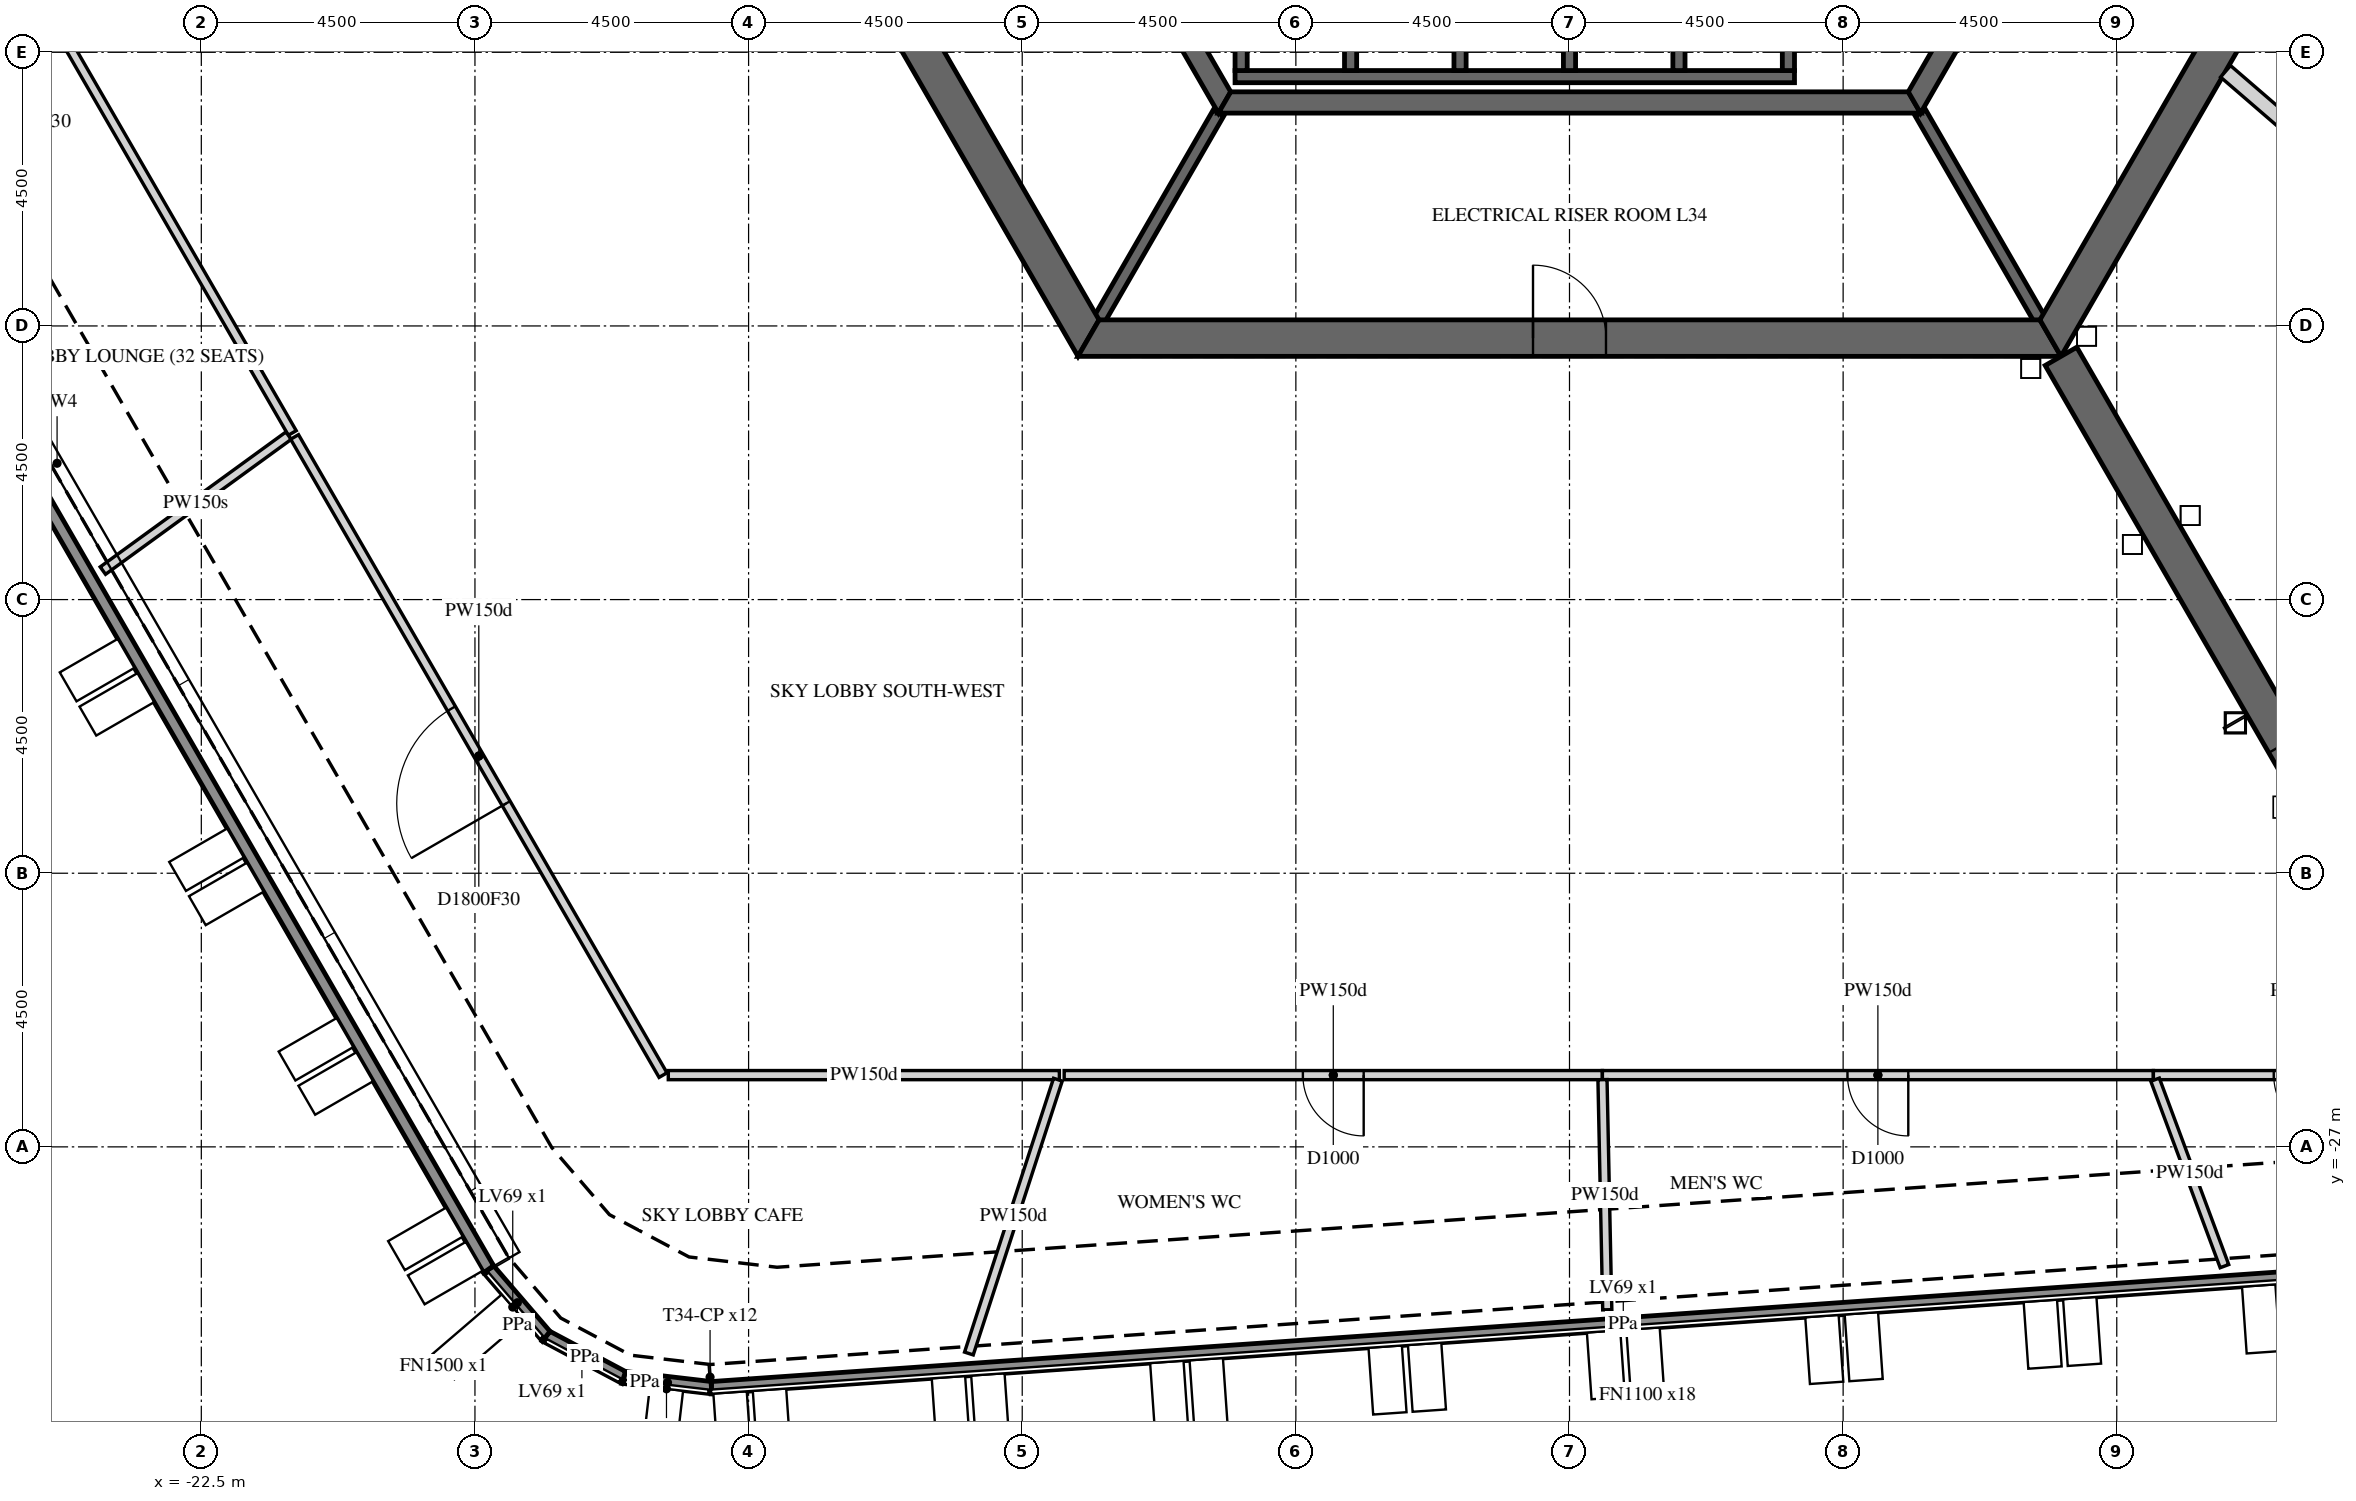
"""IFC4 building model, lengths in metres.
Left out: names, types, materials, properties, quantities, classifications, styles, units other than length and angle.
Written with IfcOpenShell. Run it as: python <this file> out.ifc"""

import sys

from ifc_helpers import new_model, si_unit, direction, frame, frame_2d, origin, place, context, subcontext, project, spatial, polyline, rectangle, outline, extrude, element, fill, save


model = new_model("IFC4")
c1 = context("Model", 3, precision=1e-05, world=origin(), true_north=direction((0.0, 1.0)))
c2 = subcontext(c1, "Body", "Model", "MODEL_VIEW")
j1 = project(units=[si_unit("LENGTHUNIT", "METRE"), si_unit("PLANEANGLEUNIT", "RADIAN")], contexts=[c1])
p1 = place(None, origin())
s1 = spatial("IfcSite", under=j1, at=p1, CompositionType="ELEMENT")
p2 = place(p1, origin())
s2 = spatial("IfcBuilding", under=s1, at=p2, CompositionType="ELEMENT")
p3 = place(p2, frame((0.0, 0.0, 146.7)))
s3 = spatial("IfcBuildingStorey", under=s2, at=p3, CompositionType="ELEMENT", Elevation=146.7)
p4 = place(p3, frame((15.868, -28.863, 5.7), z_axis=(0.0, 0.0, 1.0), x_axis=(-0.99756405733, -0.069756372641, 0.0)))
e1 = element("IfcWall", 1, at=p4, inside=s3, PredefinedType="PARAPET", context=c2, shape_type="SweptSolid", body=[
    extrude(outline(polyline([(0.008, -0.1), (30.044, -0.1), (30.063, 0.1), (-0.008, 0.1), (0.008, -0.1)])), origin(), (0.0, 0.0, 1.0), 1.1),
])
p5 = place(p3, frame((-14.112, -30.96, 5.7), z_axis=(0.0, 0.0, 1.0), x_axis=(-0.993251202983, 0.115982963286, 0.0)))
e2 = element("IfcWall", 2, at=p5, inside=s3, PredefinedType="PARAPET", context=c2, shape_type="SweptSolid", body=[
    extrude(outline(polyline([(0.009, -0.1), (1.434, -0.1), (1.471, 0.1), (-0.009, 0.1), (0.009, -0.1)])), origin(), (0.0, 0.0, 1.0), 1.1),
])
p6 = place(p3, frame((-15.555, -30.791, 5.7), z_axis=(0.0, 0.0, 1.0), x_axis=(-0.882946998442, 0.46947268072, 0.0)))
e3 = element("IfcWall", 3, at=p6, inside=s3, PredefinedType="PARAPET", context=c2, shape_type="SweptSolid", body=[
    extrude(outline(polyline([(0.019, -0.1), (1.424, -0.1), (1.462, 0.1), (-0.019, 0.1), (0.019, -0.1)])), origin(), (0.0, 0.0, 1.0), 1.1),
])
p7 = place(p3, frame((-16.829, -30.114, 5.7), z_axis=(0.0, 0.0, 1.0), x_axis=(-0.651732002744, 0.75844933687, 0.0)))
e4 = element("IfcWall", 4, at=p7, inside=s3, PredefinedType="PARAPET", context=c2, shape_type="SweptSolid", body=[
    extrude(outline(polyline([(0.019, -0.1), (1.443, -0.1), (1.462, 0.1), (-0.019, 0.1), (0.019, -0.1)])), origin(), (0.0, 0.0, 1.0), 1.1),
])
p8 = place(p3, frame((-17.776, -29.012, 5.7), z_axis=(0.0, 0.0, 1.0), x_axis=(-0.499996465352, 0.866027444505, 0.0)))
e5 = element("IfcWall", 5, at=p8, inside=s3, PredefinedType="PARAPET", context=c2, shape_type="SweptSolid", body=[
    extrude(outline(polyline([(0.009, -0.1), (30.045, -0.1), (30.062, 0.1), (-0.009, 0.1), (0.009, -0.1)])), origin(), (0.0, 0.0, 1.0), 1.1),
])
p9 = place(p3, frame((-15.819, 0.0, -0.3), z_axis=(0.0, 0.0, 1.0), x_axis=(0.499999880136, -0.866025472988, 0.0)))
e6 = element("IfcWall", 6, at=p9, inside=s3, PredefinedType="SHEAR", context=c2, shape_type="SweptSolid", body=[
    extrude(outline(polyline([(-0.173, -0.3), (15.993, -0.3), (15.646, 0.3), (0.173, 0.3), (-0.173, -0.3)])), origin(), (0.0, 0.0, 1.0), 5.8),
])
p10 = place(p9, frame((6.981, 0.0, 0.3)))
e7 = element("IfcOpeningElement", 7, at=p10, cuts=e6, PredefinedType="OPENING", context=c2, shape_type="SweptSolid", body=[
    extrude(rectangle(XDim=1.8, YDim=2.4, at=frame_2d((0.9, 1.2))), frame((0.0, 0.31, 0.0), z_axis=(0.0, -1.0, 0.0), x_axis=(1.0, 0.0, 0.0)), (0.0, 0.0, 1.0), 0.62),
])
p11 = place(p3, frame((-7.91, -13.7, -0.3), z_axis=(0.0, 0.0, 1.0), x_axis=(1.0, 0.0, 0.0)))
e8 = element("IfcWall", 8, at=p11, inside=s3, PredefinedType="SHEAR", context=c2, shape_type="SweptSolid", body=[
    extrude(outline(polyline([(-0.173, -0.3), (15.993, -0.3), (15.646, 0.3), (0.173, 0.3), (-0.173, -0.3)])), origin(), (0.0, 0.0, 1.0), 5.8),
])
p12 = place(p11, frame((7.31, 0.0, 0.3)))
e9 = element("IfcOpeningElement", 9, at=p12, cuts=e8, PredefinedType="OPENING", context=c2, shape_type="SweptSolid", body=[
    extrude(rectangle(XDim=1.2, YDim=2.4, at=frame_2d((0.6, 1.2))), frame((0.0, 0.31, 0.0), z_axis=(0.0, -1.0, 0.0), x_axis=(1.0, 0.0, 0.0)), (0.0, 0.0, 1.0), 0.62),
])
p13 = place(p3, frame((7.91, -13.7, -0.3), z_axis=(0.0, 0.0, 1.0), x_axis=(0.499999880136, 0.866025472988, 0.0)))
e10 = element("IfcWall", 10, at=p13, inside=s3, PredefinedType="SHEAR", context=c2, shape_type="SweptSolid", body=[
    extrude(outline(polyline([(-0.173, -0.3), (15.993, -0.3), (15.646, 0.3), (0.173, 0.3), (-0.173, -0.3)])), origin(), (0.0, 0.0, 1.0), 5.8),
])
p14 = place(p13, frame((7.039, 0.0, 0.3)))
e11 = element("IfcOpeningElement", 11, at=p14, cuts=e10, PredefinedType="OPENING", context=c2, shape_type="SweptSolid", body=[
    extrude(rectangle(XDim=1.8, YDim=2.4, at=frame_2d((0.9, 1.2))), frame((0.0, 0.31, 0.0), z_axis=(0.0, -1.0, 0.0), x_axis=(1.0, 0.0, 0.0)), (0.0, 0.0, 1.0), 0.62),
])
p15 = place(p3, frame((8.083, -14.0, -0.3), z_axis=(0.0, 0.0, 1.0), x_axis=(0.499997680643, -0.866026742862, 0.0)))
e12 = element("IfcWall", 12, at=p15, inside=s3, PredefinedType="SHEAR", context=c2, shape_type="SweptSolid", body=[
    extrude(rectangle(XDim=16.509, YDim=0.6, at=frame_2d((8.254, 0.0))), origin(), (0.0, 0.0, 1.0), 5.8),
])
p16 = place(p15, frame((7.354, 0.0, 0.3)))
e13 = element("IfcOpeningElement", 13, at=p16, cuts=e12, PredefinedType="OPENING", context=c2, shape_type="SweptSolid", body=[
    extrude(rectangle(XDim=1.8, YDim=2.4, at=frame_2d((0.9, 1.2))), frame((0.0, 0.31, 0.0), z_axis=(0.0, -1.0, 0.0), x_axis=(1.0, 0.0, 0.0)), (0.0, 0.0, 1.0), 0.62),
])
p17 = place(p3, frame((-11.345, 0.0, -0.3), z_axis=(0.0, 0.0, 1.0), x_axis=(0.499995046907, -0.866028263435, 0.0)))
e14 = element("IfcWall", 14, at=p17, inside=s3, PredefinedType="SHEAR", context=c2, shape_type="SweptSolid", body=[
    extrude(outline(polyline([(-0.101, -0.175), (11.446, -0.175), (11.244, 0.175), (0.101, 0.175), (-0.101, -0.175)])), origin(), (0.0, 0.0, 1.0), 5.8),
])
p18 = place(p17, frame((4.744, 0.0, 0.3)))
e15 = element("IfcOpeningElement", 15, at=p18, cuts=e14, PredefinedType="OPENING", context=c2, shape_type="SweptSolid", body=[
    extrude(rectangle(XDim=1.8, YDim=2.4, at=frame_2d((0.9, 1.2))), frame((0.0, 0.185, 0.0), z_axis=(0.0, -1.0, 0.0), x_axis=(1.0, 0.0, 0.0)), (0.0, 0.0, 1.0), 0.37),
])
p19 = place(p3, frame((-5.673, -9.825, -0.3), z_axis=(0.0, 0.0, 1.0), x_axis=(1.0, 0.0, 0.0)))
e16 = element("IfcWall", 16, at=p19, inside=s3, PredefinedType="SHEAR", context=c2, shape_type="SweptSolid", body=[
    extrude(outline(polyline([(-0.101, -0.175), (11.446, -0.175), (11.244, 0.175), (0.101, 0.175), (-0.101, -0.175)])), origin(), (0.0, 0.0, 1.0), 5.8),
])
p20 = place(p3, frame((5.673, -9.825, -0.3), z_axis=(0.0, 0.0, 1.0), x_axis=(0.499995046907, 0.866028263435, 0.0)))
e17 = element("IfcWall", 17, at=p20, inside=s3, PredefinedType="SHEAR", context=c2, shape_type="SweptSolid", body=[
    extrude(outline(polyline([(-0.101, -0.175), (11.446, -0.175), (11.244, 0.175), (0.101, 0.175), (-0.101, -0.175)])), origin(), (0.0, 0.0, 1.0), 5.8),
])
p21 = place(p20, frame((4.801, 0.0, 0.3)))
e18 = element("IfcOpeningElement", 18, at=p21, cuts=e17, PredefinedType="OPENING", context=c2, shape_type="SweptSolid", body=[
    extrude(rectangle(XDim=1.8, YDim=2.4, at=frame_2d((0.9, 1.2))), frame((0.0, 0.185, 0.0), z_axis=(0.0, -1.0, 0.0), x_axis=(1.0, 0.0, 0.0)), (0.0, 0.0, 1.0), 0.37),
])
p22 = place(p3, frame((-5.5, -9.4, -0.25), z_axis=(0.0, 0.0, 1.0), x_axis=(1.0, 0.0, 0.0)))
e19 = element("IfcWall", 19, at=p22, inside=s3, PredefinedType="SHEAR", context=c2, shape_type="SweptSolid", body=[
    extrude(rectangle(XDim=9.2, YDim=0.2, at=frame_2d((4.6, 0.0))), origin(), (0.0, 0.0, 1.0), 5.75),
])
for number, where, z_axis, x_axis in (
    (20, (-5.4, -9.3, -0.25), (0.0, 0.0, 1.0), (0.0, 1.0, 0.0)),
    (21, (-3.6, -9.3, -0.25), (0.0, 0.0, 1.0), (0.0, 1.0, 0.0)),
    (22, (-1.8, -9.3, -0.25), (0.0, 0.0, 1.0), (0.0, 1.0, 0.0)),
    (23, (0.0, -9.3, -0.25), (0.0, 0.0, 1.0), (0.0, 1.0, 0.0)),
    (24, (1.8, -9.3, -0.25), (0.0, 0.0, 1.0), (0.0, 1.0, 0.0)),
    (25, (3.6, -9.3, -0.25), (0.0, 0.0, 1.0), (0.0, 1.0, 0.0)),
):
    element("IfcWall", number, at=place(p3, frame(where, z_axis=z_axis, x_axis=x_axis)), inside=s3, PredefinedType="SHEAR", context=c2, shape_type="SweptSolid", body=[
        extrude(rectangle(XDim=2.9, YDim=0.2, at=frame_2d((1.45, 0.0))), origin(), (0.0, 0.0, 1.0), 5.75),
    ])
for number, where, z_axis, x_axis in (
    (26, (-5.773, -10.0, -0.3), (0.0, 0.0, 1.0), (-0.5, -0.866, 0.0)),
    (27, (5.773, -10.0, -0.3), (0.0, 0.0, 1.0), (0.5, -0.866, 0.0)),
):
    element("IfcWall", number, at=place(p3, frame(where, z_axis=z_axis, x_axis=x_axis)), inside=s3, PredefinedType="SHEAR", context=c2, shape_type="SweptSolid", body=[
        extrude(rectangle(XDim=3.926, YDim=0.2, at=frame_2d((1.963, 0.0))), origin(), (0.0, 0.0, 1.0), 5.8),
    ])
p23 = place(p3, frame((-21.004, -15.26, 0.0), z_axis=(0.0, 0.0, 1.0), x_axis=(-0.500003019955, 0.866023660206, 0.0)))
e28 = element("IfcWall", 28, at=p23, inside=s3, PredefinedType="PARTITIONING", context=c2, shape_type="SweptSolid", body=[
    extrude(rectangle(XDim=17.274, YDim=0.15, at=frame_2d((8.637, 0.0))), origin(), (0.0, 0.0, 1.0), 5.5),
])
p24 = place(p23, frame((7.737, 0.0, 0.0)))
e29 = element("IfcOpeningElement", 29, at=p24, cuts=e28, PredefinedType="OPENING", context=c2, shape_type="SweptSolid", body=[
    extrude(rectangle(XDim=1.8, YDim=2.1, at=frame_2d((0.9, 1.05))), frame((0.0, 0.085, 0.0), z_axis=(0.0, -1.0, 0.0), x_axis=(1.0, 0.0, 0.0)), (0.0, 0.0, 1.0), 0.17),
])
p25 = place(p3, frame((-24.119, -17.524, 0.0), z_axis=(0.0, 0.0, 1.0), x_axis=(0.808965341516, 0.587856339786, 0.0)))
e30 = element("IfcWall", 30, at=p25, inside=s3, PredefinedType="PARTITIONING", context=c2, shape_type="SweptSolid", body=[
    extrude(rectangle(XDim=3.775, YDim=0.15, at=frame_2d((1.888, 0.0))), origin(), (0.0, 0.0, 1.0), 4.573),
])
p26 = place(p3, frame((-14.907, -25.82, 0.0), z_axis=(0.0, 0.0, 1.0), x_axis=(-0.500006708318, 0.866021530701, 0.0)))
e31 = element("IfcWall", 31, at=p26, inside=s3, PredefinedType="PARTITIONING", context=c2, shape_type="SweptSolid", body=[
    extrude(rectangle(XDim=12.118, YDim=0.15, at=frame_2d((6.059, 0.0))), origin(), (0.0, 0.0, 1.0), 5.5),
])
p27 = place(p26, frame((5.159, 0.0, 0.0)))
e32 = element("IfcOpeningElement", 32, at=p27, cuts=e31, PredefinedType="OPENING", context=c2, shape_type="SweptSolid", body=[
    extrude(rectangle(XDim=1.8, YDim=2.1, at=frame_2d((0.9, 1.05))), frame((0.0, 0.085, 0.0), z_axis=(0.0, -1.0, 0.0), x_axis=(1.0, 0.0, 0.0)), (0.0, 0.0, 1.0), 0.17),
])
p28 = place(p3, frame((-14.82, -25.82, 0.0), z_axis=(0.0, 0.0, 1.0), x_axis=(1.0, 0.0, 0.0)))
e33 = element("IfcWall", 33, at=p28, inside=s3, PredefinedType="PARTITIONING", context=c2, shape_type="SweptSolid", body=[
    extrude(rectangle(XDim=6.431, YDim=0.15, at=frame_2d((3.216, 0.0))), origin(), (0.0, 0.0, 1.0), 5.5),
])
p29 = place(p3, frame((-9.877, -30.398, 0.0), z_axis=(0.0, 0.0, 1.0), x_axis=(0.309056925189, 0.95104354106, 0.0)))
e34 = element("IfcWall", 34, at=p29, inside=s3, PredefinedType="PARTITIONING", context=c2, shape_type="SweptSolid", body=[
    extrude(rectangle(XDim=4.735, YDim=0.15, at=frame_2d((2.367, 0.0))), origin(), (0.0, 0.0, 1.0), 5.5),
])
p30 = place(p3, frame((0.541, -25.82, 0.0), z_axis=(0.0, 0.0, 1.0), x_axis=(-1.0, 0.0, 0.0)))
e35 = element("IfcWall", 35, at=p30, inside=s3, PredefinedType="PARTITIONING", context=c2, shape_type="SweptSolid", body=[
    extrude(rectangle(XDim=8.851, YDim=0.15, at=frame_2d((4.426, 0.0))), origin(), (0.0, 0.0, 1.0), 5.5),
])
p31 = place(p30, frame((3.926, 0.0, 0.0)))
e36 = element("IfcOpeningElement", 36, at=p31, cuts=e35, PredefinedType="OPENING", context=c2, shape_type="SweptSolid", body=[
    extrude(rectangle(XDim=1.0, YDim=2.1, at=frame_2d((0.5, 1.05))), frame((0.0, 0.085, 0.0), z_axis=(0.0, -1.0, 0.0), x_axis=(1.0, 0.0, 0.0)), (0.0, 0.0, 1.0), 0.17),
])
p32 = place(p3, frame((9.602, -25.82, 0.0), z_axis=(0.0, 0.0, 1.0), x_axis=(-1.0, 0.0, 0.0)))
e37 = element("IfcWall", 37, at=p32, inside=s3, PredefinedType="PARTITIONING", context=c2, shape_type="SweptSolid", body=[
    extrude(rectangle(XDim=9.061, YDim=0.15, at=frame_2d((4.531, 0.0))), origin(), (0.0, 0.0, 1.0), 5.5),
])
p33 = place(p32, frame((4.031, 0.0, 0.0)))
e38 = element("IfcOpeningElement", 38, at=p33, cuts=e37, PredefinedType="OPENING", context=c2, shape_type="SweptSolid", body=[
    extrude(rectangle(XDim=1.0, YDim=2.1, at=frame_2d((0.5, 1.05))), frame((0.0, 0.085, 0.0), z_axis=(0.0, -1.0, 0.0), x_axis=(1.0, 0.0, 0.0)), (0.0, 0.0, 1.0), 0.17),
])
p34 = place(p3, frame((0.621, -29.679, 0.0), z_axis=(0.0, 0.0, 1.0), x_axis=(-0.020771051759, 0.999784258432, 0.0)))
e39 = element("IfcWall", 39, at=p34, inside=s3, PredefinedType="PARTITIONING", context=c2, shape_type="SweptSolid", body=[
    extrude(rectangle(XDim=3.785, YDim=0.15, at=frame_2d((1.892, 0.0))), origin(), (0.0, 0.0, 1.0), 5.5),
])
p35 = place(p3, frame((14.561, -25.82, 0.0), z_axis=(0.0, 0.0, 1.0), x_axis=(-1.0, 0.0, 0.0)))
e40 = element("IfcWall", 40, at=p35, inside=s3, PredefinedType="PARTITIONING", context=c2, shape_type="SweptSolid", body=[
    extrude(rectangle(XDim=4.959, YDim=0.15, at=frame_2d((2.479, 0.0))), origin(), (0.0, 0.0, 1.0), 5.5),
])
p36 = place(p35, frame((1.979, 0.0, 0.0)))
e41 = element("IfcOpeningElement", 41, at=p36, cuts=e40, PredefinedType="OPENING", context=c2, shape_type="SweptSolid", body=[
    extrude(rectangle(XDim=1.0, YDim=2.1, at=frame_2d((0.5, 1.05))), frame((0.0, 0.085, 0.0), z_axis=(0.0, -1.0, 0.0), x_axis=(1.0, 0.0, 0.0)), (0.0, 0.0, 1.0), 0.17),
])
p37 = place(p3, frame((10.771, -28.961, 0.0), z_axis=(0.0, 0.0, 1.0), x_axis=(-0.348701701209, 0.937233761435, 0.0)))
e42 = element("IfcWall", 42, at=p37, inside=s3, PredefinedType="PARTITIONING", context=c2, shape_type="SweptSolid", body=[
    extrude(rectangle(XDim=3.272, YDim=0.15, at=frame_2d((1.636, 0.0))), origin(), (0.0, 0.0, 1.0), 5.5),
])
p38 = place(p3, frame((17.74, -15.313, 0.0), z_axis=(0.0, 0.0, 1.0), x_axis=(-0.756988584599, 0.653428100702, 0.0)))
e43 = element("IfcWall", 43, at=p38, inside=s3, PredefinedType="PARTITIONING", context=c2, shape_type="SweptSolid", body=[
    extrude(rectangle(XDim=9.182, YDim=0.25, at=frame_2d((4.591, 0.0))), origin(), (0.0, 0.0, 1.0), 4.573),
])
p39 = place(p38, frame((3.991, 0.0, 0.0)))
e44 = element("IfcOpeningElement", 44, at=p39, cuts=e43, PredefinedType="OPENING", context=c2, shape_type="SweptSolid", body=[
    extrude(rectangle(XDim=1.2, YDim=2.1, at=frame_2d((0.6, 1.05))), frame((0.0, 0.135, 0.0), z_axis=(0.0, -1.0, 0.0), x_axis=(1.0, 0.0, 0.0)), (0.0, 0.0, 1.0), 0.27),
])
p40 = place(p12, origin())
e45 = element("IfcDoor", 45, at=p40, inside=s3, OperationType="SINGLE_SWING_LEFT", PredefinedType="DOOR", context=c2, shape_type="SweptSolid", body=[
    extrude(rectangle(XDim=1.2, YDim=2.4, at=frame_2d((0.6, 1.2))), frame((0.0, 0.025, 0.0), z_axis=(0.0, -1.0, 0.0), x_axis=(1.0, 0.0, 0.0)), (0.0, 0.0, 1.0), 0.05),
])
fill(e9, e45)
p41 = place(p27, origin())
e46 = element("IfcDoor", 46, at=p41, inside=s3, OperationType="DOUBLE_DOOR_SINGLE_SWING", PredefinedType="DOOR", context=c2, shape_type="SweptSolid", body=[
    extrude(rectangle(XDim=1.8, YDim=2.1, at=frame_2d((0.9, 1.05))), frame((0.0, 0.025, 0.0), z_axis=(0.0, -1.0, 0.0), x_axis=(1.0, 0.0, 0.0)), (0.0, 0.0, 1.0), 0.05),
])
fill(e32, e46)
p42 = place(p31, origin())
e47 = element("IfcDoor", 47, at=p42, inside=s3, OperationType="SINGLE_SWING_RIGHT", PredefinedType="DOOR", context=c2, shape_type="SweptSolid", body=[
    extrude(rectangle(XDim=1.0, YDim=2.1, at=frame_2d((0.5, 1.05))), frame((0.0, 0.025, 0.0), z_axis=(0.0, -1.0, 0.0), x_axis=(1.0, 0.0, 0.0)), (0.0, 0.0, 1.0), 0.05),
])
fill(e36, e47)
p43 = place(p33, origin())
e48 = element("IfcDoor", 48, at=p43, inside=s3, OperationType="SINGLE_SWING_RIGHT", PredefinedType="DOOR", context=c2, shape_type="SweptSolid", body=[
    extrude(rectangle(XDim=1.0, YDim=2.1, at=frame_2d((0.5, 1.05))), frame((0.0, 0.025, 0.0), z_axis=(0.0, -1.0, 0.0), x_axis=(1.0, 0.0, 0.0)), (0.0, 0.0, 1.0), 0.05),
])
fill(e38, e48)
p44 = place(p36, origin())
e49 = element("IfcDoor", 49, at=p44, inside=s3, OperationType="SINGLE_SWING_LEFT", PredefinedType="DOOR", context=c2, shape_type="SweptSolid", body=[
    extrude(rectangle(XDim=1.0, YDim=2.1, at=frame_2d((0.5, 1.05))), frame((0.0, 0.025, 0.0), z_axis=(0.0, -1.0, 0.0), x_axis=(1.0, 0.0, 0.0)), (0.0, 0.0, 1.0), 0.05),
])
fill(e41, e49)
save(model, sys.argv[1])
